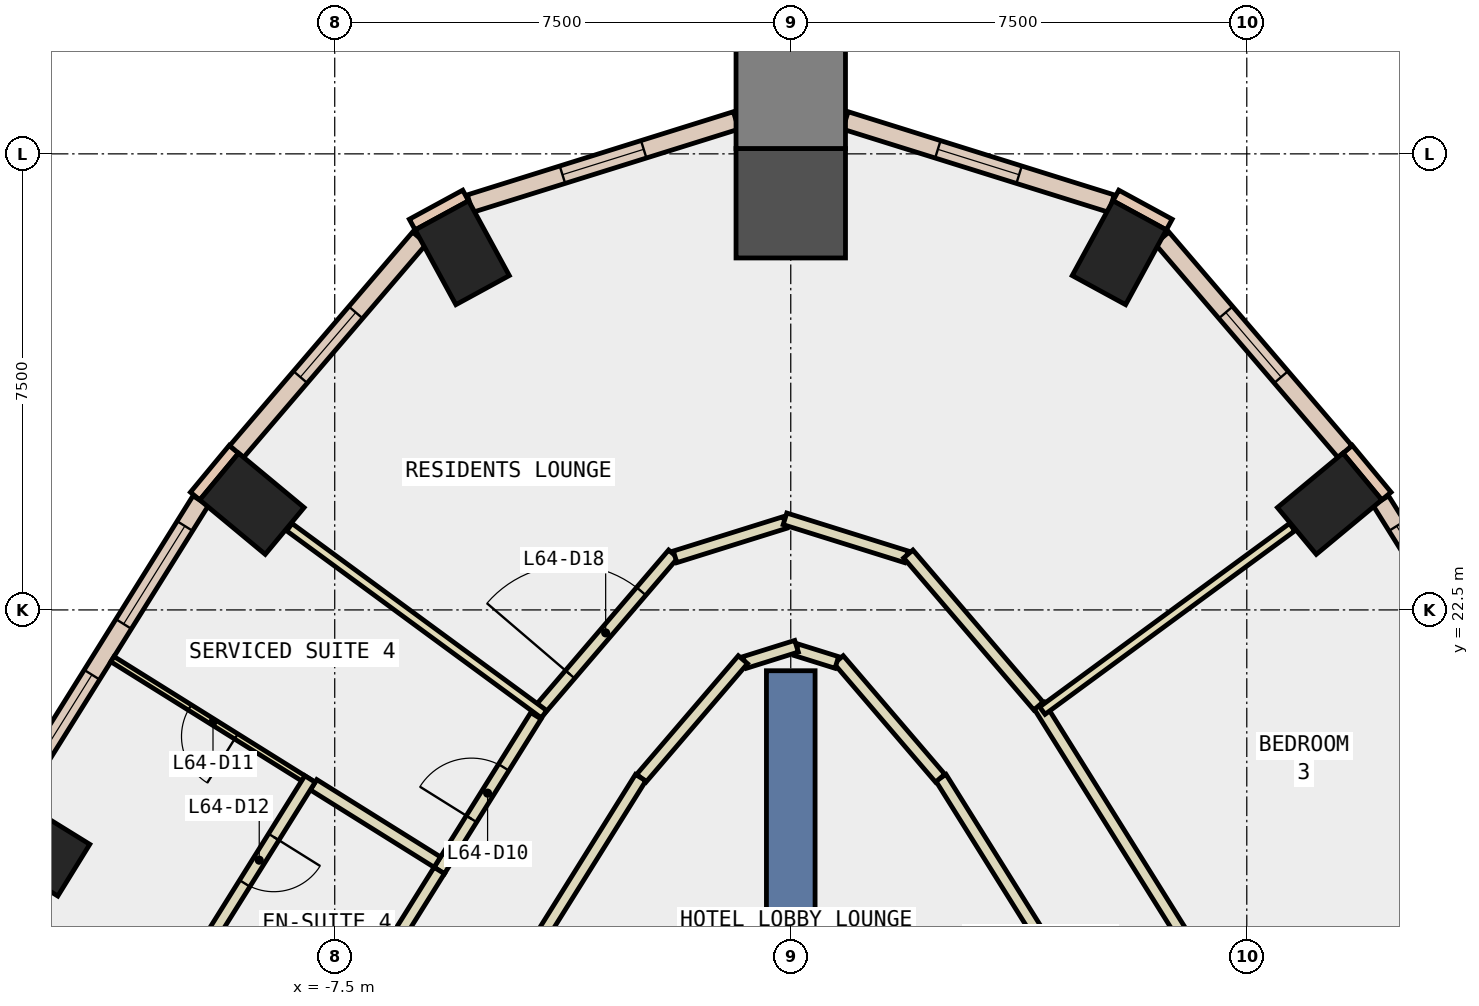
"""IFC4 building model, lengths in metres.
Left out: names, types, materials, properties, quantities, classifications, styles, units other than length and angle.
Written with IfcOpenShell. Run it as: python <this file> out.ifc"""

import sys

from ifc_helpers import new_model, si_unit, direction, frame, frame_2d, origin, origin_2d, place, context, subcontext, project, spatial, rectangle, extrude, element, fill, save


model = new_model("IFC4")
c1 = context("Model", 3, precision=1e-05, world=origin(), true_north=direction((0.0, 1.0)))
c2 = subcontext(c1, "Body", "Model", "MODEL_VIEW")
j1 = project(units=[si_unit("LENGTHUNIT", "METRE"), si_unit("PLANEANGLEUNIT", "RADIAN")], contexts=[c1])
p1 = place(None, origin())
s1 = spatial("IfcSite", under=j1, at=p1, CompositionType="ELEMENT")
p2 = place(p1, origin())
s2 = spatial("IfcBuilding", under=s1, at=p2, CompositionType="ELEMENT")
p3 = place(p2, frame((0.0, 0.0, 277.4)))
s3 = spatial("IfcBuildingStorey", under=s2, at=p3, CompositionType="ELEMENT", Elevation=277.4)
for number, where, z_axis, x_axis in (
    (1, (8.862, 24.246, -0.34), (0.0, 0.0, 1.0), (-0.639, 0.769, 0.0)),
    (2, (5.403, 28.374, -0.34), (0.0, 0.0, 1.0), (-0.878, 0.478, 0.0)),
):
    element("IfcColumn", number, at=place(p3, frame(where, z_axis=z_axis, x_axis=x_axis)), inside=s3, PredefinedType="COLUMN", context=c2, shape_type="SweptSolid", body=[
        extrude(rectangle(XDim=1.0, YDim=1.4, at=origin_2d()), origin(), (0.0, 0.0, 1.0), 3.34),
    ])
p4 = place(p3, frame((0.0, 29.188, -0.34), z_axis=(0.0, 0.0, 1.0), x_axis=(0.0, 1.0, 0.0)))
e3 = element("IfcColumn", 3, at=p4, inside=s3, PredefinedType="COLUMN", context=c2, shape_type="SweptSolid", body=[
    extrude(rectangle(XDim=1.8, YDim=1.8, at=origin_2d()), origin(), (0.0, 0.0, 1.0), 3.34),
])
for number, where, z_axis, x_axis in (
    (4, (-5.403, 28.374, -0.34), (0.0, 0.0, 1.0), (0.878, 0.478, 0.0)),
    (5, (-8.862, 24.246, -0.34), (0.0, 0.0, 1.0), (0.639, 0.769, 0.0)),
    (6, (-12.387, 18.588, -0.34), (0.0, 0.0, 1.0), (0.526, 0.851, 0.0)),
):
    element("IfcColumn", number, at=place(p3, frame(where, z_axis=z_axis, x_axis=x_axis)), inside=s3, PredefinedType="COLUMN", context=c2, shape_type="SweptSolid", body=[
        extrude(rectangle(XDim=1.0, YDim=1.4, at=origin_2d()), origin(), (0.0, 0.0, 1.0), 3.34),
    ])
p5 = place(p3, frame((0.0, 30.988, -0.34), z_axis=(0.0, 0.0, 1.0), x_axis=(0.0, 1.0, 0.0)))
e7 = element("IfcColumn", 7, at=p5, inside=s3, PredefinedType="COLUMN", context=c2, shape_type="SweptSolid", body=[
    extrude(rectangle(XDim=1.8, YDim=1.8, at=origin_2d()), origin(), (0.0, 0.0, 1.0), 3.34),
])
p6 = place(p3, frame((0.0, 12.5, -0.34), z_axis=(0.0, 0.0, 1.0), x_axis=(0.0, 1.0, 0.0)))
e8 = element("IfcWall", 8, at=p6, inside=s3, PredefinedType="SHEAR", context=c2, shape_type="SweptSolid", body=[
    extrude(rectangle(XDim=9.0, YDim=0.8, at=frame_2d((4.5, 0.0))), origin(), (0.0, 0.0, 1.0), 3.34),
])
for number, where, z_axis, x_axis in (
    (9, (6.225, 28.837, 0.0), (0.0, 0.0, 1.0), (-0.878, 0.478, 0.0)),
    (10, (-5.347, 29.315, 0.0), (0.0, 0.0, 1.0), (-0.878, -0.478, 0.0)),
):
    element("IfcWall", number, at=place(p3, frame(where, z_axis=z_axis, x_axis=x_axis)), inside=s3, PredefinedType="STANDARD", context=c2, shape_type="SweptSolid", body=[
        extrude(rectangle(XDim=1.0, YDim=0.2, at=frame_2d((0.5, 0.0))), origin(), (0.0, 0.0, 1.0), 3.0),
    ])
for number, where, z_axis, x_axis in (
    (11, (9.796, 24.372, 0.0), (0.0, 0.0, 1.0), (-0.638, 0.77, 0.0)),
    (12, (-9.158, 25.142, 0.0), (0.0, 0.0, 1.0), (-0.638, -0.77, 0.0)),
):
    element("IfcWall", number, at=place(p3, frame(where, z_axis=z_axis, x_axis=x_axis)), inside=s3, PredefinedType="STANDARD", context=c2, shape_type="SweptSolid", body=[
        extrude(rectangle(XDim=1.0, YDim=0.2, at=frame_2d((0.5, 0.0))), origin(), (0.0, 0.0, 1.0), 3.0),
    ])
p7 = place(p3, frame((12.761, 19.405, 0.0), z_axis=(0.0, 0.0, 1.0), x_axis=(-0.529915244244, 0.848050608111, 0.0)))
e13 = element("IfcWall", 13, at=p7, inside=s3, PredefinedType="STANDARD", context=c2, shape_type="SweptSolid", body=[
    extrude(rectangle(XDim=5.769, YDim=0.3, at=frame_2d((2.884, 0.0))), origin(), (0.0, 0.0, 1.0), 3.0),
])
p8 = place(p7, frame((0.492, 0.0, 0.9)))
e14 = element("IfcOpeningElement", 14, at=p8, cuts=e13, PredefinedType="OPENING", context=c2, shape_type="SweptSolid", body=[
    extrude(rectangle(XDim=1.9, YDim=2.0, at=frame_2d((0.95, 1.0))), frame((0.0, 0.16, 0.0), z_axis=(0.0, -1.0, 0.0), x_axis=(1.0, 0.0, 0.0)), (0.0, 0.0, 1.0), 0.32),
])
p9 = place(p7, frame((3.376, 0.0, 0.9)))
e15 = element("IfcOpeningElement", 15, at=p9, cuts=e13, PredefinedType="OPENING", context=c2, shape_type="SweptSolid", body=[
    extrude(rectangle(XDim=1.9, YDim=2.0, at=frame_2d((0.95, 1.0))), frame((0.0, 0.16, 0.0), z_axis=(0.0, -1.0, 0.0), x_axis=(1.0, 0.0, 0.0)), (0.0, 0.0, 1.0), 0.32),
])
p10 = place(p3, frame((9.114, 25.104, 0.0), z_axis=(0.0, 0.0, 1.0), x_axis=(-0.650534879197, 0.759476379454, 0.0)))
e16 = element("IfcWall", 16, at=p10, inside=s3, PredefinedType="STANDARD", context=c2, shape_type="SweptSolid", body=[
    extrude(rectangle(XDim=4.625, YDim=0.3, at=frame_2d((2.313, 0.0))), origin(), (0.0, 0.0, 1.0), 3.0),
])
p11 = place(p10, frame((1.613, 0.0, 0.9)))
e17 = element("IfcOpeningElement", 17, at=p11, cuts=e16, PredefinedType="OPENING", context=c2, shape_type="SweptSolid", body=[
    extrude(rectangle(XDim=1.4, YDim=2.0, at=frame_2d((0.7, 1.0))), frame((0.0, 0.16, 0.0), z_axis=(0.0, -1.0, 0.0), x_axis=(1.0, 0.0, 0.0)), (0.0, 0.0, 1.0), 0.32),
])
p12 = place(p3, frame((5.275, 29.182, 0.0), z_axis=(0.0, 0.0, 1.0), x_axis=(-0.954438278963, 0.298408397417, 0.0)))
e18 = element("IfcWall", 18, at=p12, inside=s3, PredefinedType="STANDARD", context=c2, shape_type="SweptSolid", body=[
    extrude(rectangle(XDim=4.585, YDim=0.3, at=frame_2d((2.292, 0.0))), origin(), (0.0, 0.0, 1.0), 3.0),
])
p13 = place(p12, frame((1.592, 0.0, 0.9)))
e19 = element("IfcOpeningElement", 19, at=p13, cuts=e18, PredefinedType="OPENING", context=c2, shape_type="SweptSolid", body=[
    extrude(rectangle(XDim=1.4, YDim=2.0, at=frame_2d((0.7, 1.0))), frame((0.0, 0.16, 0.0), z_axis=(0.0, -1.0, 0.0), x_axis=(1.0, 0.0, 0.0)), (0.0, 0.0, 1.0), 0.32),
])
p14 = place(p3, frame((-0.899, 30.55, 0.0), z_axis=(0.0, 0.0, 1.0), x_axis=(-0.954438278963, -0.298408397417, 0.0)))
e20 = element("IfcWall", 20, at=p14, inside=s3, PredefinedType="STANDARD", context=c2, shape_type="SweptSolid", body=[
    extrude(rectangle(XDim=4.585, YDim=0.3, at=frame_2d((2.292, 0.0))), origin(), (0.0, 0.0, 1.0), 3.0),
])
p15 = place(p14, frame((1.592, 0.0, 0.9)))
e21 = element("IfcOpeningElement", 21, at=p15, cuts=e20, PredefinedType="OPENING", context=c2, shape_type="SweptSolid", body=[
    extrude(rectangle(XDim=1.4, YDim=2.0, at=frame_2d((0.7, 1.0))), frame((0.0, 0.16, 0.0), z_axis=(0.0, -1.0, 0.0), x_axis=(1.0, 0.0, 0.0)), (0.0, 0.0, 1.0), 0.32),
])
p16 = place(p3, frame((-6.105, 28.617, 0.0), z_axis=(0.0, 0.0, 1.0), x_axis=(-0.650534879197, -0.759476379454, 0.0)))
e22 = element("IfcWall", 22, at=p16, inside=s3, PredefinedType="STANDARD", context=c2, shape_type="SweptSolid", body=[
    extrude(rectangle(XDim=4.625, YDim=0.3, at=frame_2d((2.313, 0.0))), origin(), (0.0, 0.0, 1.0), 3.0),
])
p17 = place(p16, frame((1.613, 0.0, 0.9)))
e23 = element("IfcOpeningElement", 23, at=p17, cuts=e22, PredefinedType="OPENING", context=c2, shape_type="SweptSolid", body=[
    extrude(rectangle(XDim=1.4, YDim=2.0, at=frame_2d((0.7, 1.0))), frame((0.0, 0.16, 0.0), z_axis=(0.0, -1.0, 0.0), x_axis=(1.0, 0.0, 0.0)), (0.0, 0.0, 1.0), 0.32),
])
p18 = place(p3, frame((-9.704, 24.297, 0.0), z_axis=(0.0, 0.0, 1.0), x_axis=(-0.529915244244, -0.848050608111, 0.0)))
e24 = element("IfcWall", 24, at=p18, inside=s3, PredefinedType="STANDARD", context=c2, shape_type="SweptSolid", body=[
    extrude(rectangle(XDim=5.769, YDim=0.3, at=frame_2d((2.884, 0.0))), origin(), (0.0, 0.0, 1.0), 3.0),
])
p19 = place(p18, frame((0.492, 0.0, 0.9)))
e25 = element("IfcOpeningElement", 25, at=p19, cuts=e24, PredefinedType="OPENING", context=c2, shape_type="SweptSolid", body=[
    extrude(rectangle(XDim=1.9, YDim=2.0, at=frame_2d((0.95, 1.0))), frame((0.0, 0.16, 0.0), z_axis=(0.0, -1.0, 0.0), x_axis=(1.0, 0.0, 0.0)), (0.0, 0.0, 1.0), 0.32),
])
p20 = place(p18, frame((3.376, 0.0, 0.9)))
e26 = element("IfcOpeningElement", 26, at=p20, cuts=e24, PredefinedType="OPENING", context=c2, shape_type="SweptSolid", body=[
    extrude(rectangle(XDim=1.9, YDim=2.0, at=frame_2d((0.95, 1.0))), frame((0.0, 0.16, 0.0), z_axis=(0.0, -1.0, 0.0), x_axis=(1.0, 0.0, 0.0)), (0.0, 0.0, 1.0), 0.32),
])
p21 = place(p3, frame((5.734, 14.516, 0.0), z_axis=(0.0, 0.0, 1.0), x_axis=(-0.529852912827, 0.848089553508, 0.0)))
e27 = element("IfcWall", 27, at=p21, inside=s3, PredefinedType="PARTITIONING", context=c2, shape_type="SweptSolid", body=[
    extrude(rectangle(XDim=6.162, YDim=0.2, at=frame_2d((3.081, 0.0))), origin(), (0.0, 0.0, 1.0), 3.0),
])
p22 = place(p3, frame((2.457, 19.733, 0.0), z_axis=(0.0, 0.0, 1.0), x_axis=(-0.650650354416, 0.759377453114, 0.0)))
e28 = element("IfcWall", 28, at=p22, inside=s3, PredefinedType="PARTITIONING", context=c2, shape_type="SweptSolid", body=[
    extrude(rectangle(XDim=2.567, YDim=0.2, at=frame_2d((1.283, 0.0))), origin(), (0.0, 0.0, 1.0), 3.0),
])
p23 = place(p3, frame((0.757, 21.636, 0.0), z_axis=(0.0, 0.0, 1.0), x_axis=(-0.954429868001, 0.298435297959, 0.0)))
e29 = element("IfcWall", 29, at=p23, inside=s3, PredefinedType="PARTITIONING", context=c2, shape_type="SweptSolid", body=[
    extrude(rectangle(XDim=0.694, YDim=0.2, at=frame_2d((0.347, 0.0))), origin(), (0.0, 0.0, 1.0), 3.0),
])
p24 = place(p3, frame((0.095, 21.903, 0.0), z_axis=(0.0, 0.0, 1.0), x_axis=(-0.954216896292, -0.299115554311, 0.0)))
e30 = element("IfcWall", 30, at=p24, inside=s3, PredefinedType="PARTITIONING", context=c2, shape_type="SweptSolid", body=[
    extrude(rectangle(XDim=0.893, YDim=0.2, at=frame_2d((0.446, 0.0))), origin(), (0.0, 0.0, 1.0), 3.0),
])
p25 = place(p3, frame((-0.787, 21.682, 0.0), z_axis=(0.0, 0.0, 1.0), x_axis=(-0.650650354416, -0.759377453114, 0.0)))
e31 = element("IfcWall", 31, at=p25, inside=s3, PredefinedType="PARTITIONING", context=c2, shape_type="SweptSolid", body=[
    extrude(rectangle(XDim=2.567, YDim=0.2, at=frame_2d((1.283, 0.0))), origin(), (0.0, 0.0, 1.0), 3.0),
])
p26 = place(p3, frame((-2.469, 19.742, 0.0), z_axis=(0.0, 0.0, 1.0), x_axis=(-0.529852912827, -0.848089553508, 0.0)))
e32 = element("IfcWall", 32, at=p26, inside=s3, PredefinedType="PARTITIONING", context=c2, shape_type="SweptSolid", body=[
    extrude(rectangle(XDim=6.162, YDim=0.2, at=frame_2d((3.081, 0.0))), origin(), (0.0, 0.0, 1.0), 3.0),
])
p27 = place(p3, frame((4.085, 20.929, 0.0), z_axis=(0.0, 0.0, 1.0), x_axis=(0.530002406791, -0.847996137253, 0.0)))
e33 = element("IfcWall", 33, at=p27, inside=s3, PredefinedType="PARTITIONING", context=c2, shape_type="SweptSolid", body=[
    extrude(rectangle(XDim=6.33, YDim=0.2, at=frame_2d((3.165, 0.0))), origin(), (0.0, 0.0, 1.0), 3.0),
])
p28 = place(p3, frame((-4.155, 20.825, 0.0), z_axis=(0.0, 0.0, 1.0), x_axis=(0.650396970678, 0.75959448427, 0.0)))
e34 = element("IfcWall", 34, at=p28, inside=s3, PredefinedType="PARTITIONING", context=c2, shape_type="SweptSolid", body=[
    extrude(rectangle(XDim=3.416, YDim=0.2, at=frame_2d((1.708, 0.0))), origin(), (0.0, 0.0, 1.0), 3.0),
])
p29 = place(p28, frame((0.808, 0.0, 0.0)))
e35 = element("IfcOpeningElement", 35, at=p29, cuts=e34, PredefinedType="OPENING", context=c2, shape_type="SweptSolid", body=[
    extrude(rectangle(XDim=1.8, YDim=2.1, at=frame_2d((0.9, 1.05))), frame((0.0, 0.11, 0.0), z_axis=(0.0, -1.0, 0.0), x_axis=(1.0, 0.0, 0.0)), (0.0, 0.0, 1.0), 0.22),
])
p30 = place(p3, frame((-1.902, 23.373, 0.0), z_axis=(0.0, 0.0, 1.0), x_axis=(0.954447851072, 0.298377779976, 0.0)))
e36 = element("IfcWall", 36, at=p30, inside=s3, PredefinedType="PARTITIONING", context=c2, shape_type="SweptSolid", body=[
    extrude(rectangle(XDim=1.893, YDim=0.2, at=frame_2d((0.947, 0.0))), origin(), (0.0, 0.0, 1.0), 3.0),
])
p31 = place(p3, frame((-0.095, 23.998, 0.0), z_axis=(0.0, 0.0, 1.0), x_axis=(0.954355336779, -0.298673552831, 0.0)))
e37 = element("IfcWall", 37, at=p31, inside=s3, PredefinedType="PARTITIONING", context=c2, shape_type="SweptSolid", body=[
    extrude(rectangle(XDim=2.093, YDim=0.2, at=frame_2d((1.046, 0.0))), origin(), (0.0, 0.0, 1.0), 3.0),
])
p32 = place(p3, frame((1.933, 23.42, 0.0), z_axis=(0.0, 0.0, 1.0), x_axis=(0.65027189398, -0.759701562391, 0.0)))
e38 = element("IfcWall", 38, at=p32, inside=s3, PredefinedType="PARTITIONING", context=c2, shape_type="SweptSolid", body=[
    extrude(rectangle(XDim=3.291, YDim=0.2, at=frame_2d((1.646, 0.0))), origin(), (0.0, 0.0, 1.0), 3.0),
])
p33 = place(p3, frame((-5.781, 18.215, 0.0), z_axis=(0.0, 0.0, 1.0), x_axis=(0.530028199927, 0.847980015851, 0.0)))
e39 = element("IfcWall", 39, at=p33, inside=s3, PredefinedType="PARTITIONING", context=c2, shape_type="SweptSolid", body=[
    extrude(rectangle(XDim=3.0, YDim=0.2, at=frame_2d((1.5, 0.0))), origin(), (0.0, 0.0, 1.0), 3.0),
])
p34 = place(p33, frame((1.0, 0.0, 0.0)))
e40 = element("IfcOpeningElement", 40, at=p34, cuts=e39, PredefinedType="OPENING", context=c2, shape_type="SweptSolid", body=[
    extrude(rectangle(XDim=1.0, YDim=2.1, at=frame_2d((0.5, 1.05))), frame((0.0, 0.11, 0.0), z_axis=(0.0, -1.0, 0.0), x_axis=(1.0, 0.0, 0.0)), (0.0, 0.0, 1.0), 0.22),
])
p35 = place(p3, frame((-7.371, 15.671, 0.0), z_axis=(0.0, 0.0, 1.0), x_axis=(0.529991625428, 0.84800287557, 0.0)))
e41 = element("IfcWall", 41, at=p35, inside=s3, PredefinedType="PARTITIONING", context=c2, shape_type="SweptSolid", body=[
    extrude(rectangle(XDim=3.0, YDim=0.2, at=frame_2d((1.5, 0.0))), origin(), (0.0, 0.0, 1.0), 3.0),
])
p36 = place(p3, frame((4.138, 20.844, 0.0), z_axis=(0.0, 0.0, 1.0), x_axis=(0.805989075855, 0.591930409426, 0.0)))
e42 = element("IfcWall", 42, at=p36, inside=s3, PredefinedType="PARTITIONING", context=c2, shape_type="SweptSolid", body=[
    extrude(rectangle(XDim=5.097, YDim=0.15, at=frame_2d((2.548, 0.0))), origin(), (0.0, 0.0, 1.0), 3.0),
])
p37 = place(p3, frame((-4.058, 20.785, 0.0), z_axis=(0.0, 0.0, 1.0), x_axis=(-0.805947688418, 0.591986759593, 0.0)))
e43 = element("IfcWall", 43, at=p37, inside=s3, PredefinedType="PARTITIONING", context=c2, shape_type="SweptSolid", body=[
    extrude(rectangle(XDim=5.196, YDim=0.15, at=frame_2d((2.598, 0.0))), origin(), (0.0, 0.0, 1.0), 3.0),
])
p38 = place(p3, frame((-7.848, 19.625, 0.0), z_axis=(0.0, 0.0, 1.0), x_axis=(-0.848188150314, 0.529695064794, 0.0)))
e44 = element("IfcWall", 44, at=p38, inside=s3, PredefinedType="PARTITIONING", context=c2, shape_type="SweptSolid", body=[
    extrude(rectangle(XDim=3.9, YDim=0.1, at=frame_2d((1.95, 0.0))), origin(), (0.0, 0.0, 1.0), 3.0),
])
p39 = place(p38, frame((1.5, 0.0, 0.0)))
e45 = element("IfcOpeningElement", 45, at=p39, cuts=e44, PredefinedType="OPENING", context=c2, shape_type="SweptSolid", body=[
    extrude(rectangle(XDim=0.9, YDim=2.1, at=frame_2d((0.45, 1.05))), frame((0.0, 0.06, 0.0), z_axis=(0.0, -1.0, 0.0), x_axis=(1.0, 0.0, 0.0)), (0.0, 0.0, 1.0), 0.12),
])
p40 = place(p3, frame((-5.813, 18.353, 0.0), z_axis=(0.0, 0.0, 1.0), x_axis=(-0.847969725239, 0.530044663287, 0.0)))
e46 = element("IfcWall", 46, at=p40, inside=s3, PredefinedType="PARTITIONING", context=c2, shape_type="SweptSolid", body=[
    extrude(rectangle(XDim=2.4, YDim=0.2, at=frame_2d((1.2, 0.0))), origin(), (0.0, 0.0, 1.0), 3.0),
])
p41 = place(p3, frame((-7.907, 19.72, 0.0), z_axis=(0.0, 0.0, 1.0), x_axis=(-0.529915322147, -0.848050559433, 0.0)))
e47 = element("IfcWall", 47, at=p41, inside=s3, PredefinedType="PARTITIONING", context=c2, shape_type="SweptSolid", body=[
    extrude(rectangle(XDim=3.149, YDim=0.2, at=frame_2d((1.575, 0.0))), origin(), (0.0, 0.0, 1.0), 3.0),
])
p42 = place(p41, frame((1.125, 0.0, 0.0)))
e48 = element("IfcOpeningElement", 48, at=p42, cuts=e47, PredefinedType="OPENING", context=c2, shape_type="SweptSolid", body=[
    extrude(rectangle(XDim=0.9, YDim=2.1, at=frame_2d((0.45, 1.05))), frame((0.0, 0.11, 0.0), z_axis=(0.0, -1.0, 0.0), x_axis=(1.0, 0.0, 0.0)), (0.0, 0.0, 1.0), 0.22),
])
p43 = place(p9, origin())
e49 = element("IfcWindow", 49, at=p43, inside=s3, PartitioningType="SINGLE_PANEL", PredefinedType="WINDOW", context=c2, shape_type="SweptSolid", body=[
    extrude(rectangle(XDim=1.9, YDim=2.0, at=frame_2d((0.95, 1.0))), frame((0.0, 0.03, 0.0), z_axis=(0.0, -1.0, 0.0), x_axis=(1.0, 0.0, 0.0)), (0.0, 0.0, 1.0), 0.06),
])
fill(e15, e49)
p44 = place(p11, origin())
e50 = element("IfcWindow", 50, at=p44, inside=s3, PartitioningType="SINGLE_PANEL", PredefinedType="WINDOW", context=c2, shape_type="SweptSolid", body=[
    extrude(rectangle(XDim=1.4, YDim=2.0, at=frame_2d((0.7, 1.0))), frame((0.0, 0.03, 0.0), z_axis=(0.0, -1.0, 0.0), x_axis=(1.0, 0.0, 0.0)), (0.0, 0.0, 1.0), 0.06),
])
fill(e17, e50)
p45 = place(p13, origin())
e51 = element("IfcWindow", 51, at=p45, inside=s3, PartitioningType="SINGLE_PANEL", PredefinedType="WINDOW", context=c2, shape_type="SweptSolid", body=[
    extrude(rectangle(XDim=1.4, YDim=2.0, at=frame_2d((0.7, 1.0))), frame((0.0, 0.03, 0.0), z_axis=(0.0, -1.0, 0.0), x_axis=(1.0, 0.0, 0.0)), (0.0, 0.0, 1.0), 0.06),
])
fill(e19, e51)
p46 = place(p15, origin())
e52 = element("IfcWindow", 52, at=p46, inside=s3, PartitioningType="SINGLE_PANEL", PredefinedType="WINDOW", context=c2, shape_type="SweptSolid", body=[
    extrude(rectangle(XDim=1.4, YDim=2.0, at=frame_2d((0.7, 1.0))), frame((0.0, 0.03, 0.0), z_axis=(0.0, -1.0, 0.0), x_axis=(1.0, 0.0, 0.0)), (0.0, 0.0, 1.0), 0.06),
])
fill(e21, e52)
p47 = place(p17, origin())
e53 = element("IfcWindow", 53, at=p47, inside=s3, PartitioningType="SINGLE_PANEL", PredefinedType="WINDOW", context=c2, shape_type="SweptSolid", body=[
    extrude(rectangle(XDim=1.4, YDim=2.0, at=frame_2d((0.7, 1.0))), frame((0.0, 0.03, 0.0), z_axis=(0.0, -1.0, 0.0), x_axis=(1.0, 0.0, 0.0)), (0.0, 0.0, 1.0), 0.06),
])
fill(e23, e53)
p48 = place(p19, origin())
e54 = element("IfcWindow", 54, at=p48, inside=s3, PartitioningType="SINGLE_PANEL", PredefinedType="WINDOW", context=c2, shape_type="SweptSolid", body=[
    extrude(rectangle(XDim=1.9, YDim=2.0, at=frame_2d((0.95, 1.0))), frame((0.0, 0.03, 0.0), z_axis=(0.0, -1.0, 0.0), x_axis=(1.0, 0.0, 0.0)), (0.0, 0.0, 1.0), 0.06),
])
fill(e25, e54)
p49 = place(p20, origin())
e55 = element("IfcWindow", 55, at=p49, inside=s3, PartitioningType="SINGLE_PANEL", PredefinedType="WINDOW", context=c2, shape_type="SweptSolid", body=[
    extrude(rectangle(XDim=1.9, YDim=2.0, at=frame_2d((0.95, 1.0))), frame((0.0, 0.03, 0.0), z_axis=(0.0, -1.0, 0.0), x_axis=(1.0, 0.0, 0.0)), (0.0, 0.0, 1.0), 0.06),
])
fill(e26, e55)
p50 = place(p34, origin())
e56 = element("IfcDoor", 56, at=p50, inside=s3, OperationType="SINGLE_SWING_RIGHT", PredefinedType="DOOR", context=c2, shape_type="SweptSolid", body=[
    extrude(rectangle(XDim=1.0, YDim=2.1, at=frame_2d((0.5, 1.05))), frame((0.0, 0.025, 0.0), z_axis=(0.0, -1.0, 0.0), x_axis=(1.0, 0.0, 0.0)), (0.0, 0.0, 1.0), 0.05),
])
fill(e40, e56)
p51 = place(p39, origin())
e57 = element("IfcDoor", 57, at=p51, inside=s3, OperationType="SINGLE_SWING_RIGHT", PredefinedType="DOOR", context=c2, shape_type="SweptSolid", body=[
    extrude(rectangle(XDim=0.9, YDim=2.1, at=frame_2d((0.45, 1.05))), frame((0.0, 0.025, 0.0), z_axis=(0.0, -1.0, 0.0), x_axis=(1.0, 0.0, 0.0)), (0.0, 0.0, 1.0), 0.05),
])
fill(e45, e57)
p52 = place(p42, origin())
e58 = element("IfcDoor", 58, at=p52, inside=s3, OperationType="SINGLE_SWING_LEFT", PredefinedType="DOOR", context=c2, shape_type="SweptSolid", body=[
    extrude(rectangle(XDim=0.9, YDim=2.1, at=frame_2d((0.45, 1.05))), frame((0.0, 0.025, 0.0), z_axis=(0.0, -1.0, 0.0), x_axis=(1.0, 0.0, 0.0)), (0.0, 0.0, 1.0), 0.05),
])
fill(e48, e58)
p53 = place(p29, origin())
e59 = element("IfcDoor", 59, at=p53, inside=s3, OperationType="DOUBLE_DOOR_SINGLE_SWING", PredefinedType="DOOR", context=c2, shape_type="SweptSolid", body=[
    extrude(rectangle(XDim=1.8, YDim=2.1, at=frame_2d((0.9, 1.05))), frame((0.0, 0.025, 0.0), z_axis=(0.0, -1.0, 0.0), x_axis=(1.0, 0.0, 0.0)), (0.0, 0.0, 1.0), 0.05),
])
fill(e35, e59)
save(model, sys.argv[1])
